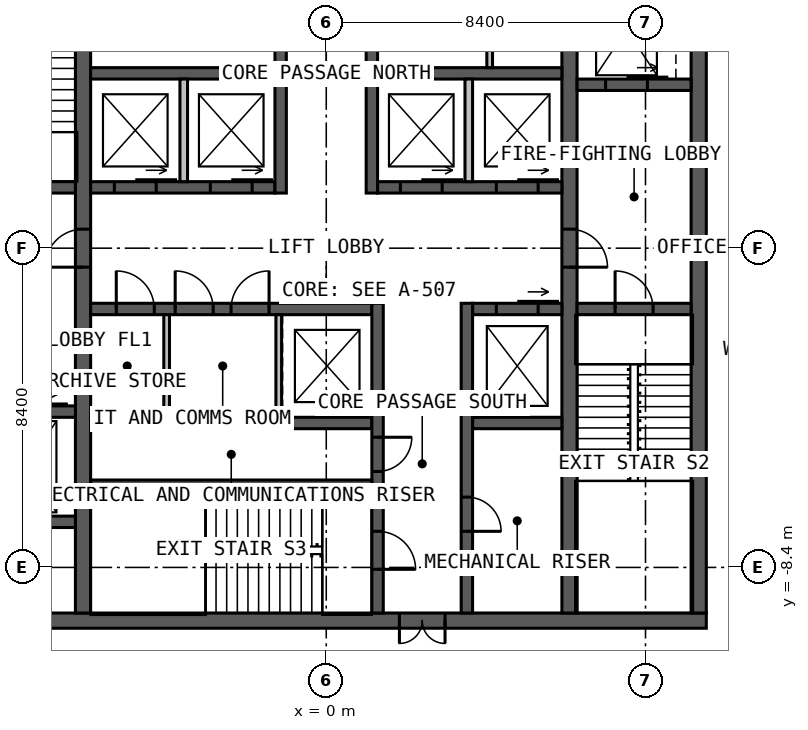
"""IFC4 building model, lengths in metres.
Left out: names, types, materials, properties, quantities, classifications, styles, units other than length and angle.
Written with IfcOpenShell. Run it as: python <this file> out.ifc"""

import sys

from ifc_helpers import new_model, si_unit, direction, frame, frame_2d, origin, place, context, subcontext, project, spatial, rectangle, extrude, element, fill, save


model = new_model("IFC4")
c1 = context("Model", 3, precision=1e-05, world=origin(), true_north=direction((0.0, 1.0)))
c2 = subcontext(c1, "Body", "Model", "MODEL_VIEW")
j1 = project(units=[si_unit("LENGTHUNIT", "METRE"), si_unit("PLANEANGLEUNIT", "RADIAN")], contexts=[c1])
p1 = place(None, origin())
s1 = spatial("IfcSite", under=j1, at=p1, CompositionType="ELEMENT")
p2 = place(p1, origin())
s2 = spatial("IfcBuilding", under=s1, at=p2, CompositionType="ELEMENT")
p3 = place(p2, frame((0.0, 0.0, 240.0)))
s3 = spatial("IfcBuildingStorey", under=s2, at=p3, CompositionType="ELEMENT", Elevation=240.0)
p4 = place(p3, frame((10.0, -9.8, 0.0), z_axis=(0.0, 0.0, 1.0), x_axis=(-1.0, 0.0, 0.0)))
e1 = element("IfcWall", 1, at=p4, inside=s3, PredefinedType="SOLIDWALL", context=c2, shape_type="SweptSolid", body=[
    extrude(rectangle(XDim=20.0, YDim=0.4, at=frame_2d((10.0, 0.0))), origin(), (0.0, 0.0, 1.0), 4.0),
])
p5 = place(p4, frame((6.875, 0.0, 0.0)))
e2 = element("IfcOpeningElement", 2, at=p5, cuts=e1, PredefinedType="OPENING", context=c2, shape_type="SweptSolid", body=[
    extrude(rectangle(XDim=1.2, YDim=2.2, at=frame_2d((0.6, 1.1))), frame((0.0, 0.21, 0.0), z_axis=(0.0, -1.0, 0.0), x_axis=(1.0, 0.0, 0.0)), (0.0, 0.0, 1.0), 0.42),
])
p6 = place(p3, frame((9.8, -9.6, 0.0), z_axis=(0.0, 0.0, 1.0), x_axis=(0.0, 1.0, 0.0)))
e3 = element("IfcWall", 3, at=p6, inside=s3, PredefinedType="SOLIDWALL", context=c2, shape_type="SweptSolid", body=[
    extrude(rectangle(XDim=19.2, YDim=0.4, at=frame_2d((9.6, 0.0))), origin(), (0.0, 0.0, 1.0), 4.0),
])
p7 = place(p3, frame((-6.4, -9.6, 0.0), z_axis=(0.0, 0.0, 1.0), x_axis=(0.0, 1.0, 0.0)))
e4 = element("IfcWall", 4, at=p7, inside=s3, PredefinedType="SOLIDWALL", context=c2, shape_type="SweptSolid", body=[
    extrude(rectangle(XDim=19.2, YDim=0.4, at=frame_2d((9.6, 0.0))), origin(), (0.0, 0.0, 1.0), 4.0),
])
p8 = place(p7, frame((9.1, 0.0, 0.0)))
e5 = element("IfcOpeningElement", 5, at=p8, cuts=e4, PredefinedType="OPENING", context=c2, shape_type="SweptSolid", body=[
    extrude(rectangle(XDim=1.0, YDim=2.2, at=frame_2d((0.5, 1.1))), frame((0.0, 0.21, 0.0), z_axis=(0.0, -1.0, 0.0), x_axis=(1.0, 0.0, 0.0)), (0.0, 0.0, 1.0), 0.42),
])
p9 = place(p3, frame((6.4, 9.6, 0.0), z_axis=(0.0, 0.0, 1.0), x_axis=(0.0, -1.0, 0.0)))
e6 = element("IfcWall", 6, at=p9, inside=s3, PredefinedType="SOLIDWALL", context=c2, shape_type="SweptSolid", body=[
    extrude(rectangle(XDim=19.2, YDim=0.4, at=frame_2d((9.6, 0.0))), origin(), (0.0, 0.0, 1.0), 4.0),
])
p10 = place(p9, frame((9.1, 0.0, 0.0)))
e7 = element("IfcOpeningElement", 7, at=p10, cuts=e6, PredefinedType="OPENING", context=c2, shape_type="SweptSolid", body=[
    extrude(rectangle(XDim=1.0, YDim=2.2, at=frame_2d((0.5, 1.1))), frame((0.0, 0.21, 0.0), z_axis=(0.0, -1.0, 0.0), x_axis=(1.0, 0.0, 0.0)), (0.0, 0.0, 1.0), 0.42),
])
p11 = place(p3, frame((-6.2, 1.6, 0.0), z_axis=(0.0, 0.0, 1.0), x_axis=(1.0, 0.0, 0.0)))
e8 = element("IfcWall", 8, at=p11, inside=s3, PredefinedType="SOLIDWALL", context=c2, shape_type="SweptSolid", body=[
    extrude(rectangle(XDim=4.85, YDim=0.3, at=frame_2d((2.425, 0.0))), origin(), (0.0, 0.0, 1.0), 4.0),
])
p12 = place(p11, frame((0.625, 0.0, 0.0)))
e9 = element("IfcOpeningElement", 9, at=p12, cuts=e8, PredefinedType="OPENING", context=c2, shape_type="SweptSolid", body=[
    extrude(rectangle(XDim=1.1, YDim=2.2, at=frame_2d((0.55, 1.1))), frame((0.0, 0.16, 0.0), z_axis=(0.0, -1.0, 0.0), x_axis=(1.0, 0.0, 0.0)), (0.0, 0.0, 1.0), 0.32),
])
p13 = place(p11, frame((3.15, 0.0, 0.0)))
e10 = element("IfcOpeningElement", 10, at=p13, cuts=e8, PredefinedType="OPENING", context=c2, shape_type="SweptSolid", body=[
    extrude(rectangle(XDim=1.1, YDim=2.2, at=frame_2d((0.55, 1.1))), frame((0.0, 0.16, 0.0), z_axis=(0.0, -1.0, 0.0), x_axis=(1.0, 0.0, 0.0)), (0.0, 0.0, 1.0), 0.32),
])
p14 = place(p3, frame((1.35, 1.6, 0.0), z_axis=(0.0, 0.0, 1.0), x_axis=(1.0, 0.0, 0.0)))
e11 = element("IfcWall", 11, at=p14, inside=s3, PredefinedType="SOLIDWALL", context=c2, shape_type="SweptSolid", body=[
    extrude(rectangle(XDim=4.85, YDim=0.3, at=frame_2d((2.425, 0.0))), origin(), (0.0, 0.0, 1.0), 4.0),
])
p15 = place(p14, frame((0.6, 0.0, 0.0)))
e12 = element("IfcOpeningElement", 12, at=p15, cuts=e11, PredefinedType="OPENING", context=c2, shape_type="SweptSolid", body=[
    extrude(rectangle(XDim=1.1, YDim=2.2, at=frame_2d((0.55, 1.1))), frame((0.0, 0.16, 0.0), z_axis=(0.0, -1.0, 0.0), x_axis=(1.0, 0.0, 0.0)), (0.0, 0.0, 1.0), 0.32),
])
p16 = place(p14, frame((3.125, 0.0, 0.0)))
e13 = element("IfcOpeningElement", 13, at=p16, cuts=e11, PredefinedType="OPENING", context=c2, shape_type="SweptSolid", body=[
    extrude(rectangle(XDim=1.1, YDim=2.2, at=frame_2d((0.55, 1.1))), frame((0.0, 0.16, 0.0), z_axis=(0.0, -1.0, 0.0), x_axis=(1.0, 0.0, 0.0)), (0.0, 0.0, 1.0), 0.32),
])
for number, where, z_axis, x_axis in (
    (14, (-6.2, 4.6, 0.0), (0.0, 0.0, 1.0), (1.0, 0.0, 0.0)),
    (15, (1.35, 4.6, 0.0), (0.0, 0.0, 1.0), (1.0, 0.0, 0.0)),
):
    element("IfcWall", number, at=place(p3, frame(where, z_axis=z_axis, x_axis=x_axis)), inside=s3, PredefinedType="SOLIDWALL", context=c2, shape_type="SweptSolid", body=[
        extrude(rectangle(XDim=4.85, YDim=0.3, at=frame_2d((2.425, 0.0))), origin(), (0.0, 0.0, 1.0), 4.0),
    ])
p17 = place(p3, frame((-1.2, 1.45, 0.0), z_axis=(0.0, 0.0, 1.0), x_axis=(0.0, 1.0, 0.0)))
e16 = element("IfcWall", 16, at=p17, inside=s3, PredefinedType="SOLIDWALL", context=c2, shape_type="SweptSolid", body=[
    extrude(rectangle(XDim=8.15, YDim=0.3, at=frame_2d((4.075, 0.0))), origin(), (0.0, 0.0, 1.0), 4.0),
])
p18 = place(p17, frame((5.05, 0.0, 0.0)))
e17 = element("IfcOpeningElement", 17, at=p18, cuts=e16, PredefinedType="OPENING", context=c2, shape_type="SweptSolid", body=[
    extrude(rectangle(XDim=1.0, YDim=2.2, at=frame_2d((0.5, 1.1))), frame((0.0, 0.16, 0.0), z_axis=(0.0, -1.0, 0.0), x_axis=(1.0, 0.0, 0.0)), (0.0, 0.0, 1.0), 0.32),
])
p19 = place(p3, frame((1.2, 1.45, 0.0), z_axis=(0.0, 0.0, 1.0), x_axis=(0.0, 1.0, 0.0)))
e18 = element("IfcWall", 18, at=p19, inside=s3, PredefinedType="SOLIDWALL", context=c2, shape_type="SweptSolid", body=[
    extrude(rectangle(XDim=8.15, YDim=0.3, at=frame_2d((4.075, 0.0))), origin(), (0.0, 0.0, 1.0), 4.0),
])
p20 = place(p19, frame((3.8, 0.0, 0.0)))
e19 = element("IfcOpeningElement", 19, at=p20, cuts=e18, PredefinedType="OPENING", context=c2, shape_type="SweptSolid", body=[
    extrude(rectangle(XDim=1.0, YDim=2.2, at=frame_2d((0.5, 1.1))), frame((0.0, 0.16, 0.0), z_axis=(0.0, -1.0, 0.0), x_axis=(1.0, 0.0, 0.0)), (0.0, 0.0, 1.0), 0.32),
])
p21 = place(p19, frame((6.15, 0.0, 0.0)))
e20 = element("IfcOpeningElement", 20, at=p21, cuts=e18, PredefinedType="OPENING", context=c2, shape_type="SweptSolid", body=[
    extrude(rectangle(XDim=1.0, YDim=2.2, at=frame_2d((0.5, 1.1))), frame((0.0, 0.16, 0.0), z_axis=(0.0, -1.0, 0.0), x_axis=(1.0, 0.0, 0.0)), (0.0, 0.0, 1.0), 0.32),
])
p22 = place(p3, frame((-6.2, -1.6, 0.0), z_axis=(0.0, 0.0, 1.0), x_axis=(1.0, 0.0, 0.0)))
e21 = element("IfcWall", 21, at=p22, inside=s3, PredefinedType="SOLIDWALL", context=c2, shape_type="SweptSolid", body=[
    extrude(rectangle(XDim=7.4, YDim=0.3, at=frame_2d((3.7, 0.0))), origin(), (0.0, 0.0, 1.0), 4.0),
])
p23 = place(p22, frame((0.675, 0.0, 0.0)))
e22 = element("IfcOpeningElement", 22, at=p23, cuts=e21, PredefinedType="OPENING", context=c2, shape_type="SweptSolid", body=[
    extrude(rectangle(XDim=1.0, YDim=2.2, at=frame_2d((0.5, 1.1))), frame((0.0, 0.16, 0.0), z_axis=(0.0, -1.0, 0.0), x_axis=(1.0, 0.0, 0.0)), (0.0, 0.0, 1.0), 0.32),
])
p24 = place(p22, frame((2.225, 0.0, 0.0)))
e23 = element("IfcOpeningElement", 23, at=p24, cuts=e21, PredefinedType="OPENING", context=c2, shape_type="SweptSolid", body=[
    extrude(rectangle(XDim=1.0, YDim=2.2, at=frame_2d((0.5, 1.1))), frame((0.0, 0.16, 0.0), z_axis=(0.0, -1.0, 0.0), x_axis=(1.0, 0.0, 0.0)), (0.0, 0.0, 1.0), 0.32),
])
p25 = place(p22, frame((3.695, 0.0, 0.0)))
e24 = element("IfcOpeningElement", 24, at=p25, cuts=e21, PredefinedType="OPENING", context=c2, shape_type="SweptSolid", body=[
    extrude(rectangle(XDim=1.0, YDim=2.2, at=frame_2d((0.5, 1.1))), frame((0.0, 0.16, 0.0), z_axis=(0.0, -1.0, 0.0), x_axis=(1.0, 0.0, 0.0)), (0.0, 0.0, 1.0), 0.32),
])
p26 = place(p3, frame((3.85, -1.6, 0.0), z_axis=(0.0, 0.0, 1.0), x_axis=(1.0, 0.0, 0.0)))
e25 = element("IfcWall", 25, at=p26, inside=s3, PredefinedType="SOLIDWALL", context=c2, shape_type="SweptSolid", body=[
    extrude(rectangle(XDim=2.35, YDim=0.3, at=frame_2d((1.175, 0.0))), origin(), (0.0, 0.0, 1.0), 4.0),
])
p27 = place(p26, frame((0.625, 0.0, 0.0)))
e26 = element("IfcOpeningElement", 26, at=p27, cuts=e25, PredefinedType="OPENING", context=c2, shape_type="SweptSolid", body=[
    extrude(rectangle(XDim=1.1, YDim=2.2, at=frame_2d((0.55, 1.1))), frame((0.0, 0.16, 0.0), z_axis=(0.0, -1.0, 0.0), x_axis=(1.0, 0.0, 0.0)), (0.0, 0.0, 1.0), 0.32),
])
p28 = place(p3, frame((-6.2, -4.6, 0.0), z_axis=(0.0, 0.0, 1.0), x_axis=(1.0, 0.0, 0.0)))
e27 = element("IfcWall", 27, at=p28, inside=s3, PredefinedType="SOLIDWALL", context=c2, shape_type="SweptSolid", body=[
    extrude(rectangle(XDim=7.4, YDim=0.3, at=frame_2d((3.7, 0.0))), origin(), (0.0, 0.0, 1.0), 4.0),
])
p29 = place(p3, frame((3.85, -4.6, 0.0), z_axis=(0.0, 0.0, 1.0), x_axis=(1.0, 0.0, 0.0)))
e28 = element("IfcWall", 28, at=p29, inside=s3, PredefinedType="SOLIDWALL", context=c2, shape_type="SweptSolid", body=[
    extrude(rectangle(XDim=2.35, YDim=0.3, at=frame_2d((1.175, 0.0))), origin(), (0.0, 0.0, 1.0), 4.0),
])
p30 = place(p3, frame((1.35, -1.45, 0.0), z_axis=(0.0, 0.0, 1.0), x_axis=(0.0, -1.0, 0.0)))
e29 = element("IfcWall", 29, at=p30, inside=s3, PredefinedType="SOLIDWALL", context=c2, shape_type="SweptSolid", body=[
    extrude(rectangle(XDim=8.15, YDim=0.3, at=frame_2d((4.075, 0.0))), origin(), (0.0, 0.0, 1.0), 4.0),
])
p31 = place(p30, frame((6.0, 0.0, 0.0)))
e30 = element("IfcOpeningElement", 30, at=p31, cuts=e29, PredefinedType="OPENING", context=c2, shape_type="SweptSolid", body=[
    extrude(rectangle(XDim=1.0, YDim=2.2, at=frame_2d((0.5, 1.1))), frame((0.0, 0.16, 0.0), z_axis=(0.0, -1.0, 0.0), x_axis=(1.0, 0.0, 0.0)), (0.0, 0.0, 1.0), 0.32),
])
p32 = place(p30, frame((3.525, 0.0, 0.0)))
e31 = element("IfcOpeningElement", 31, at=p32, cuts=e29, PredefinedType="OPENING", context=c2, shape_type="SweptSolid", body=[
    extrude(rectangle(XDim=0.9, YDim=2.2, at=frame_2d((0.45, 1.1))), frame((0.0, 0.16, 0.0), z_axis=(0.0, -1.0, 0.0), x_axis=(1.0, 0.0, 0.0)), (0.0, 0.0, 1.0), 0.32),
])
p33 = place(p3, frame((3.7, -1.45, 0.0), z_axis=(0.0, 0.0, 1.0), x_axis=(0.0, -1.0, 0.0)))
e32 = element("IfcWall", 32, at=p33, inside=s3, PredefinedType="SOLIDWALL", context=c2, shape_type="SweptSolid", body=[
    extrude(rectangle(XDim=8.15, YDim=0.3, at=frame_2d((4.075, 0.0))), origin(), (0.0, 0.0, 1.0), 4.0),
])
p34 = place(p33, frame((5.1, 0.0, 0.0)))
e33 = element("IfcOpeningElement", 33, at=p34, cuts=e32, PredefinedType="OPENING", context=c2, shape_type="SweptSolid", body=[
    extrude(rectangle(XDim=0.9, YDim=2.2, at=frame_2d((0.45, 1.1))), frame((0.0, 0.16, 0.0), z_axis=(0.0, -1.0, 0.0), x_axis=(1.0, 0.0, 0.0)), (0.0, 0.0, 1.0), 0.32),
])
p35 = place(p3, frame((-6.2, -6.2, 0.0), z_axis=(0.0, 0.0, 1.0), x_axis=(1.0, 0.0, 0.0)))
e34 = element("IfcWall", 34, at=p35, inside=s3, PredefinedType="SOLIDWALL", context=c2, shape_type="SweptSolid", body=[
    extrude(rectangle(XDim=7.4, YDim=0.2, at=frame_2d((3.7, 0.0))), origin(), (0.0, 0.0, 1.0), 4.0),
])
p36 = place(p3, frame((-9.6, 1.6, 0.0), z_axis=(0.0, 0.0, 1.0), x_axis=(1.0, 0.0, 0.0)))
e35 = element("IfcWall", 35, at=p36, inside=s3, PredefinedType="SOLIDWALL", context=c2, shape_type="SweptSolid", body=[
    extrude(rectangle(XDim=3.0, YDim=0.3, at=frame_2d((1.5, 0.0))), origin(), (0.0, 0.0, 1.0), 4.0),
])
p37 = place(p36, frame((1.0, 0.0, 0.0)))
e36 = element("IfcOpeningElement", 36, at=p37, cuts=e35, PredefinedType="OPENING", context=c2, shape_type="SweptSolid", body=[
    extrude(rectangle(XDim=1.0, YDim=2.2, at=frame_2d((0.5, 1.1))), frame((0.0, 0.16, 0.0), z_axis=(0.0, -1.0, 0.0), x_axis=(1.0, 0.0, 0.0)), (0.0, 0.0, 1.0), 0.32),
])
p38 = place(p3, frame((6.6, -1.6, 0.0), z_axis=(0.0, 0.0, 1.0), x_axis=(1.0, 0.0, 0.0)))
e37 = element("IfcWall", 37, at=p38, inside=s3, PredefinedType="SOLIDWALL", context=c2, shape_type="SweptSolid", body=[
    extrude(rectangle(XDim=3.0, YDim=0.3, at=frame_2d((1.5, 0.0))), origin(), (0.0, 0.0, 1.0), 4.0),
])
p39 = place(p38, frame((1.0, 0.0, 0.0)))
e38 = element("IfcOpeningElement", 38, at=p39, cuts=e37, PredefinedType="OPENING", context=c2, shape_type="SweptSolid", body=[
    extrude(rectangle(XDim=1.0, YDim=2.2, at=frame_2d((0.5, 1.1))), frame((0.0, 0.16, 0.0), z_axis=(0.0, -1.0, 0.0), x_axis=(1.0, 0.0, 0.0)), (0.0, 0.0, 1.0), 0.32),
])
p40 = place(p3, frame((-9.6, -4.3, 0.0), z_axis=(0.0, 0.0, 1.0), x_axis=(1.0, 0.0, 0.0)))
e39 = element("IfcWall", 39, at=p40, inside=s3, PredefinedType="SOLIDWALL", context=c2, shape_type="SweptSolid", body=[
    extrude(rectangle(XDim=3.0, YDim=0.3, at=frame_2d((1.5, 0.0))), origin(), (0.0, 0.0, 1.0), 4.0),
])
p41 = place(p40, frame((1.15, 0.0, 0.0)))
e40 = element("IfcOpeningElement", 40, at=p41, cuts=e39, PredefinedType="OPENING", context=c2, shape_type="SweptSolid", body=[
    extrude(rectangle(XDim=1.1, YDim=2.2, at=frame_2d((0.55, 1.1))), frame((0.0, 0.16, 0.0), z_axis=(0.0, -1.0, 0.0), x_axis=(1.0, 0.0, 0.0)), (0.0, 0.0, 1.0), 0.32),
])
p42 = place(p3, frame((6.6, 4.3, 0.0), z_axis=(0.0, 0.0, 1.0), x_axis=(1.0, 0.0, 0.0)))
e41 = element("IfcWall", 41, at=p42, inside=s3, PredefinedType="SOLIDWALL", context=c2, shape_type="SweptSolid", body=[
    extrude(rectangle(XDim=3.0, YDim=0.3, at=frame_2d((1.5, 0.0))), origin(), (0.0, 0.0, 1.0), 4.0),
])
p43 = place(p42, frame((0.75, 0.0, 0.0)))
e42 = element("IfcOpeningElement", 42, at=p43, cuts=e41, PredefinedType="OPENING", context=c2, shape_type="SweptSolid", body=[
    extrude(rectangle(XDim=1.1, YDim=2.2, at=frame_2d((0.55, 1.1))), frame((0.0, 0.16, 0.0), z_axis=(0.0, -1.0, 0.0), x_axis=(1.0, 0.0, 0.0)), (0.0, 0.0, 1.0), 0.32),
])
p44 = place(p3, frame((-9.6, -7.2, 0.0), z_axis=(0.0, 0.0, 1.0), x_axis=(1.0, 0.0, 0.0)))
e43 = element("IfcWall", 43, at=p44, inside=s3, PredefinedType="SOLIDWALL", context=c2, shape_type="SweptSolid", body=[
    extrude(rectangle(XDim=3.0, YDim=0.3, at=frame_2d((1.5, 0.0))), origin(), (0.0, 0.0, 1.0), 4.0),
])
for number, where, z_axis, x_axis in (
    (44, (-3.75, 1.75, 0.0), (0.0, 0.0, 1.0), (0.0, 1.0, 0.0)),
    (45, (3.75, 1.75, 0.0), (0.0, 0.0, 1.0), (0.0, 1.0, 0.0)),
):
    element("IfcWall", number, at=place(p3, frame(where, z_axis=z_axis, x_axis=x_axis)), inside=s3, PredefinedType="SOLIDWALL", context=c2, shape_type="SweptSolid", body=[
        extrude(rectangle(XDim=2.7, YDim=0.2, at=frame_2d((1.35, 0.0))), origin(), (0.0, 0.0, 1.0), 3.75),
    ])
p45 = place(p3, frame((4.3, 4.75, 0.0), z_axis=(0.0, 0.0, 1.0), x_axis=(0.0, 1.0, 0.0)))
e46 = element("IfcWall", 46, at=p45, inside=s3, PredefinedType="PARTITIONING", context=c2, shape_type="SweptSolid", body=[
    extrude(rectangle(XDim=2.375, YDim=0.15, at=frame_2d((1.188, 0.0))), origin(), (0.0, 0.0, 1.0), 3.75),
])
for number, where, z_axis, x_axis in (
    (47, (-4.2, -1.75, 0.0), (0.0, 0.0, 1.0), (0.0, -1.0, 0.0)),
    (48, (-1.25, -1.75, 0.0), (0.0, 0.0, 1.0), (0.0, -1.0, 0.0)),
):
    element("IfcWall", number, at=place(p3, frame(where, z_axis=z_axis, x_axis=x_axis)), inside=s3, PredefinedType="PARTITIONING", context=c2, shape_type="SweptSolid", body=[
        extrude(rectangle(XDim=2.7, YDim=0.15, at=frame_2d((1.35, 0.0))), origin(), (0.0, 0.0, 1.0), 3.75),
    ])
p46 = place(p5, origin())
e49 = element("IfcDoor", 49, at=p46, inside=s3, OperationType="DOUBLE_DOOR_SINGLE_SWING", PredefinedType="DOOR", context=c2, shape_type="SweptSolid", body=[
    extrude(rectangle(XDim=1.2, YDim=2.2, at=frame_2d((0.6, 1.1))), frame((0.0, 0.025, 0.0), z_axis=(0.0, -1.0, 0.0), x_axis=(1.0, 0.0, 0.0)), (0.0, 0.0, 1.0), 0.05),
])
fill(e2, e49)
p47 = place(p8, origin())
e50 = element("IfcDoor", 50, at=p47, inside=s3, OperationType="SINGLE_SWING_LEFT", PredefinedType="DOOR", context=c2, shape_type="SweptSolid", body=[
    extrude(rectangle(XDim=1.0, YDim=2.2, at=frame_2d((0.5, 1.1))), frame((0.0, 0.025, 0.0), z_axis=(0.0, -1.0, 0.0), x_axis=(1.0, 0.0, 0.0)), (0.0, 0.0, 1.0), 0.05),
])
fill(e5, e50)
p48 = place(p10, origin())
e51 = element("IfcDoor", 51, at=p48, inside=s3, OperationType="SINGLE_SWING_RIGHT", PredefinedType="DOOR", context=c2, shape_type="SweptSolid", body=[
    extrude(rectangle(XDim=1.0, YDim=2.2, at=frame_2d((0.5, 1.1))), frame((0.0, 0.025, 0.0), z_axis=(0.0, -1.0, 0.0), x_axis=(1.0, 0.0, 0.0)), (0.0, 0.0, 1.0), 0.05),
])
fill(e7, e51)
p49 = place(p39, origin())
e52 = element("IfcDoor", 52, at=p49, inside=s3, OperationType="SINGLE_SWING_LEFT", PredefinedType="DOOR", context=c2, shape_type="SweptSolid", body=[
    extrude(rectangle(XDim=1.0, YDim=2.2, at=frame_2d((0.5, 1.1))), frame((0.0, 0.025, 0.0), z_axis=(0.0, -1.0, 0.0), x_axis=(1.0, 0.0, 0.0)), (0.0, 0.0, 1.0), 0.05),
])
fill(e38, e52)
p50 = place(p31, origin())
e53 = element("IfcDoor", 53, at=p50, inside=s3, OperationType="SINGLE_SWING_RIGHT", PredefinedType="DOOR", context=c2, shape_type="SweptSolid", body=[
    extrude(rectangle(XDim=1.0, YDim=2.2, at=frame_2d((0.5, 1.1))), frame((0.0, 0.025, 0.0), z_axis=(0.0, -1.0, 0.0), x_axis=(1.0, 0.0, 0.0)), (0.0, 0.0, 1.0), 0.05),
])
fill(e30, e53)
p51 = place(p32, origin())
e54 = element("IfcDoor", 54, at=p51, inside=s3, OperationType="SINGLE_SWING_LEFT", PredefinedType="DOOR", context=c2, shape_type="SweptSolid", body=[
    extrude(rectangle(XDim=0.9, YDim=2.2, at=frame_2d((0.45, 1.1))), frame((0.0, 0.025, 0.0), z_axis=(0.0, -1.0, 0.0), x_axis=(1.0, 0.0, 0.0)), (0.0, 0.0, 1.0), 0.05),
])
fill(e31, e54)
p52 = place(p34, origin())
e55 = element("IfcDoor", 55, at=p52, inside=s3, OperationType="SINGLE_SWING_RIGHT", PredefinedType="DOOR", context=c2, shape_type="SweptSolid", body=[
    extrude(rectangle(XDim=0.9, YDim=2.2, at=frame_2d((0.45, 1.1))), frame((0.0, 0.025, 0.0), z_axis=(0.0, -1.0, 0.0), x_axis=(1.0, 0.0, 0.0)), (0.0, 0.0, 1.0), 0.05),
])
fill(e33, e55)
p53 = place(p23, origin())
e56 = element("IfcDoor", 56, at=p53, inside=s3, OperationType="SINGLE_SWING_LEFT", PredefinedType="DOOR", context=c2, shape_type="SweptSolid", body=[
    extrude(rectangle(XDim=1.0, YDim=2.2, at=frame_2d((0.5, 1.1))), frame((0.0, 0.025, 0.0), z_axis=(0.0, -1.0, 0.0), x_axis=(1.0, 0.0, 0.0)), (0.0, 0.0, 1.0), 0.05),
])
fill(e22, e56)
p54 = place(p24, origin())
e57 = element("IfcDoor", 57, at=p54, inside=s3, OperationType="SINGLE_SWING_LEFT", PredefinedType="DOOR", context=c2, shape_type="SweptSolid", body=[
    extrude(rectangle(XDim=1.0, YDim=2.2, at=frame_2d((0.5, 1.1))), frame((0.0, 0.025, 0.0), z_axis=(0.0, -1.0, 0.0), x_axis=(1.0, 0.0, 0.0)), (0.0, 0.0, 1.0), 0.05),
])
fill(e23, e57)
p55 = place(p25, origin())
e58 = element("IfcDoor", 58, at=p55, inside=s3, OperationType="SINGLE_SWING_RIGHT", PredefinedType="DOOR", context=c2, shape_type="SweptSolid", body=[
    extrude(rectangle(XDim=1.0, YDim=2.2, at=frame_2d((0.5, 1.1))), frame((0.0, 0.025, 0.0), z_axis=(0.0, -1.0, 0.0), x_axis=(1.0, 0.0, 0.0)), (0.0, 0.0, 1.0), 0.05),
])
fill(e24, e58)
p56 = place(p12, origin())
e59 = element("IfcDoor", 59, at=p56, inside=s3, OperationType="SLIDING_TO_LEFT", PredefinedType="DOOR", context=c2, shape_type="SweptSolid", body=[
    extrude(rectangle(XDim=1.1, YDim=2.2, at=frame_2d((0.55, 1.1))), frame((0.0, 0.025, 0.0), z_axis=(0.0, -1.0, 0.0), x_axis=(1.0, 0.0, 0.0)), (0.0, 0.0, 1.0), 0.05),
])
fill(e9, e59)
p57 = place(p13, origin())
e60 = element("IfcDoor", 60, at=p57, inside=s3, OperationType="SLIDING_TO_LEFT", PredefinedType="DOOR", context=c2, shape_type="SweptSolid", body=[
    extrude(rectangle(XDim=1.1, YDim=2.2, at=frame_2d((0.55, 1.1))), frame((0.0, 0.025, 0.0), z_axis=(0.0, -1.0, 0.0), x_axis=(1.0, 0.0, 0.0)), (0.0, 0.0, 1.0), 0.05),
])
fill(e10, e60)
p58 = place(p15, origin())
e61 = element("IfcDoor", 61, at=p58, inside=s3, OperationType="SLIDING_TO_LEFT", PredefinedType="DOOR", context=c2, shape_type="SweptSolid", body=[
    extrude(rectangle(XDim=1.1, YDim=2.2, at=frame_2d((0.55, 1.1))), frame((0.0, 0.025, 0.0), z_axis=(0.0, -1.0, 0.0), x_axis=(1.0, 0.0, 0.0)), (0.0, 0.0, 1.0), 0.05),
])
fill(e12, e61)
p59 = place(p16, origin())
e62 = element("IfcDoor", 62, at=p59, inside=s3, OperationType="SLIDING_TO_LEFT", PredefinedType="DOOR", context=c2, shape_type="SweptSolid", body=[
    extrude(rectangle(XDim=1.1, YDim=2.2, at=frame_2d((0.55, 1.1))), frame((0.0, 0.025, 0.0), z_axis=(0.0, -1.0, 0.0), x_axis=(1.0, 0.0, 0.0)), (0.0, 0.0, 1.0), 0.05),
])
fill(e13, e62)
p60 = place(p27, origin())
e63 = element("IfcDoor", 63, at=p60, inside=s3, OperationType="SLIDING_TO_LEFT", PredefinedType="DOOR", context=c2, shape_type="SweptSolid", body=[
    extrude(rectangle(XDim=1.1, YDim=2.2, at=frame_2d((0.55, 1.1))), frame((0.0, 0.025, 0.0), z_axis=(0.0, -1.0, 0.0), x_axis=(1.0, 0.0, 0.0)), (0.0, 0.0, 1.0), 0.05),
])
fill(e26, e63)
p61 = place(p43, origin())
e64 = element("IfcDoor", 64, at=p61, inside=s3, OperationType="SLIDING_TO_LEFT", PredefinedType="DOOR", context=c2, shape_type="SweptSolid", body=[
    extrude(rectangle(XDim=1.1, YDim=2.2, at=frame_2d((0.55, 1.1))), frame((0.0, 0.025, 0.0), z_axis=(0.0, -1.0, 0.0), x_axis=(1.0, 0.0, 0.0)), (0.0, 0.0, 1.0), 0.05),
])
fill(e42, e64)
save(model, sys.argv[1])
